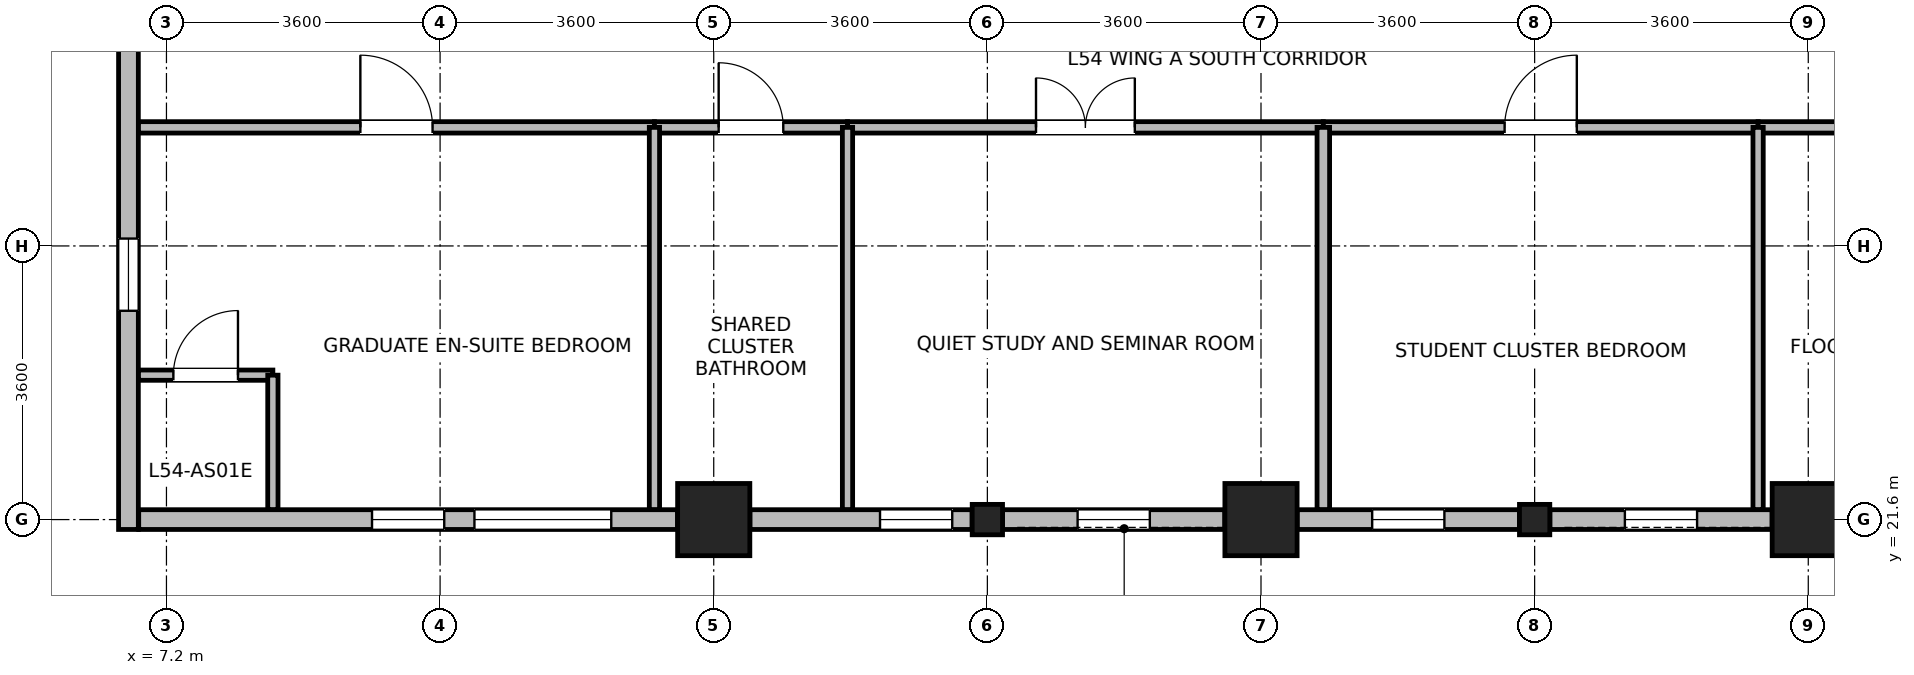
"""IFC4 building model, lengths in metres.
Left out: names, types, materials, properties, quantities, classifications, styles, units other than length and angle.
Written with IfcOpenShell. Run it as: python <this file> out.ifc"""

import sys

from ifc_helpers import new_model, si_unit, direction, frame, frame_2d, origin, origin_2d, place, context, subcontext, project, spatial, rectangle, i_section, extrude, source, transform, mapped, element, fill, save


model = new_model("IFC4")
c1 = context("Model", 3, precision=1e-05, world=origin(), true_north=direction((0.0, 1.0)))
c2 = subcontext(c1, "Body", "Model", "MODEL_VIEW")
j1 = project(units=[si_unit("LENGTHUNIT", "METRE"), si_unit("PLANEANGLEUNIT", "RADIAN")], contexts=[c1])
p1 = place(None, origin())
s1 = spatial("IfcSite", under=j1, at=p1, CompositionType="ELEMENT")
p2 = place(p1, origin())
s2 = spatial("IfcBuilding", under=s1, at=p2, CompositionType="ELEMENT")
p3 = place(p2, frame((0.0, 0.0, 212.9)))
s3 = spatial("IfcBuildingStorey", under=s2, at=p3, CompositionType="ELEMENT", Elevation=212.9)
m1 = source(origin(), c2, "Body", "SweptSolid", [
    extrude(rectangle(XDim=0.95, YDim=0.95, at=origin_2d()), origin(), (0.0, 0.0, 1.0), 3.7),
])
for number, where, z_axis, x_axis in (
    (1, (14.4, 21.6, 0.0), (0.0, 0.0, 1.0), (1.0, 0.0, 0.0)),
    (2, (21.6, 21.6, 0.0), (0.0, 0.0, 1.0), (1.0, 0.0, 0.0)),
    (3, (28.8, 21.6, 0.0), (0.0, 0.0, 1.0), (1.0, 0.0, 0.0)),
):
    element("IfcColumn", number, at=place(p3, frame(where, z_axis=z_axis, x_axis=x_axis)), inside=s3, PredefinedType="COLUMN", context=c2, shape_type="MappedRepresentation", body=[
        mapped(m1, transform((0.0, 0.0, 0.0), x_axis=(1.0, 0.0, 0.0), y_axis=(0.0, 1.0, 0.0), z_axis=(0.0, 0.0, 1.0), scale=1.0)),
    ])
m2 = source(origin(), c2, "Body", "SweptSolid", [
    extrude(i_section(OverallWidth=0.399, OverallDepth=0.4, WebThickness=0.017, FlangeThickness=0.023, FilletRadius=0.015, at=origin_2d()), origin(), (0.0, 0.0, 1.0), 3.7),
])
for number, where, z_axis, x_axis in (
    (4, (18.0, 21.6, 0.0), (0.0, 0.0, 1.0), (1.0, 0.0, 0.0)),
    (5, (25.2, 21.6, 0.0), (0.0, 0.0, 1.0), (1.0, 0.0, 0.0)),
):
    element("IfcColumn", number, at=place(p3, frame(where, z_axis=z_axis, x_axis=x_axis)), inside=s3, PredefinedType="COLUMN", context=c2, shape_type="MappedRepresentation", body=[
        mapped(m2, transform((0.0, 0.0, 0.0), x_axis=(1.0, 0.0, 0.0), y_axis=(0.0, 1.0, 0.0), z_axis=(0.0, 0.0, 1.0), scale=1.0)),
    ])
p4 = place(p3, frame((6.7, 21.47, 0.0), z_axis=(0.0, 0.0, 1.0), x_axis=(0.0, 1.0, 0.0)))
e6 = element("IfcWall", 6, at=p4, inside=s3, PredefinedType="STANDARD", context=c2, shape_type="SweptSolid", body=[
    extrude(rectangle(XDim=6.704, YDim=0.26, at=frame_2d((3.352, 0.0))), origin(), (0.0, 0.0, 1.0), 3.45),
])
p5 = place(p4, frame((2.877, 0.0, 0.85)))
e7 = element("IfcOpeningElement", 7, at=p5, cuts=e6, PredefinedType="OPENING", context=c2, shape_type="SweptSolid", body=[
    extrude(rectangle(XDim=0.95, YDim=1.75, at=frame_2d((0.475, 0.875))), frame((0.0, 0.14, 0.0), z_axis=(0.0, -1.0, 0.0), x_axis=(1.0, 0.0, 0.0)), (0.0, 0.0, 1.0), 0.28),
])
p6 = place(p3, frame((13.924, 21.6, 0.0), z_axis=(0.0, 0.0, 1.0), x_axis=(-1.0, 0.0, 0.0)))
e8 = element("IfcWall", 8, at=p6, inside=s3, PredefinedType="STANDARD", context=c2, shape_type="SweptSolid", body=[
    extrude(rectangle(XDim=7.089, YDim=0.26, at=frame_2d((3.544, 0.0))), origin(), (0.0, 0.0, 1.0), 3.45),
])
p7 = place(p6, frame((0.872, 0.0, 0.85)))
e9 = element("IfcOpeningElement", 9, at=p7, cuts=e8, PredefinedType="OPENING", context=c2, shape_type="SweptSolid", body=[
    extrude(rectangle(XDim=1.8, YDim=1.85, at=frame_2d((0.9, 0.925))), frame((0.0, 0.14, 0.0), z_axis=(0.0, -1.0, 0.0), x_axis=(1.0, 0.0, 0.0)), (0.0, 0.0, 1.0), 0.28),
])
p8 = place(p6, frame((3.07, 0.0, 0.85)))
e10 = element("IfcOpeningElement", 10, at=p8, cuts=e8, PredefinedType="OPENING", context=c2, shape_type="SweptSolid", body=[
    extrude(rectangle(XDim=0.95, YDim=1.75, at=frame_2d((0.475, 0.875))), frame((0.0, 0.14, 0.0), z_axis=(0.0, -1.0, 0.0), x_axis=(1.0, 0.0, 0.0)), (0.0, 0.0, 1.0), 0.28),
])
p9 = place(p3, frame((17.8, 21.6, 0.0), z_axis=(0.0, 0.0, 1.0), x_axis=(-1.0, 0.0, 0.0)))
e11 = element("IfcWall", 11, at=p9, inside=s3, PredefinedType="STANDARD", context=c2, shape_type="SweptSolid", body=[
    extrude(rectangle(XDim=2.924, YDim=0.26, at=frame_2d((1.462, 0.0))), origin(), (0.0, 0.0, 1.0), 3.05),
])
p10 = place(p9, frame((0.262, 0.0, 0.85)))
e12 = element("IfcOpeningElement", 12, at=p10, cuts=e11, PredefinedType="OPENING", context=c2, shape_type="SweptSolid", body=[
    extrude(rectangle(XDim=0.95, YDim=1.75, at=frame_2d((0.475, 0.875))), frame((0.0, 0.14, 0.0), z_axis=(0.0, -1.0, 0.0), x_axis=(1.0, 0.0, 0.0)), (0.0, 0.0, 1.0), 0.28),
])
p11 = place(p3, frame((21.124, 21.6, 0.0), z_axis=(0.0, 0.0, 1.0), x_axis=(-1.0, 0.0, 0.0)))
e13 = element("IfcWall", 13, at=p11, inside=s3, PredefinedType="STANDARD", context=c2, shape_type="SweptSolid", body=[
    extrude(rectangle(XDim=2.924, YDim=0.26, at=frame_2d((1.462, 0.0))), origin(), (0.0, 0.0, 1.0), 3.05),
])
p12 = place(p11, frame((0.987, 0.0, 0.85)))
e14 = element("IfcOpeningElement", 14, at=p12, cuts=e13, PredefinedType="OPENING", context=c2, shape_type="SweptSolid", body=[
    extrude(rectangle(XDim=0.95, YDim=1.75, at=frame_2d((0.475, 0.875))), frame((0.0, 0.14, 0.0), z_axis=(0.0, -1.0, 0.0), x_axis=(1.0, 0.0, 0.0)), (0.0, 0.0, 1.0), 0.28),
])
p13 = place(p3, frame((25.0, 21.6, 0.0), z_axis=(0.0, 0.0, 1.0), x_axis=(-1.0, 0.0, 0.0)))
e15 = element("IfcWall", 15, at=p13, inside=s3, PredefinedType="STANDARD", context=c2, shape_type="SweptSolid", body=[
    extrude(rectangle(XDim=2.924, YDim=0.26, at=frame_2d((1.462, 0.0))), origin(), (0.0, 0.0, 1.0), 3.05),
])
p14 = place(p13, frame((0.987, 0.0, 0.85)))
e16 = element("IfcOpeningElement", 16, at=p14, cuts=e15, PredefinedType="OPENING", context=c2, shape_type="SweptSolid", body=[
    extrude(rectangle(XDim=0.95, YDim=1.75, at=frame_2d((0.475, 0.875))), frame((0.0, 0.14, 0.0), z_axis=(0.0, -1.0, 0.0), x_axis=(1.0, 0.0, 0.0)), (0.0, 0.0, 1.0), 0.28),
])
p15 = place(p3, frame((28.324, 21.6, 0.0), z_axis=(0.0, 0.0, 1.0), x_axis=(-1.0, 0.0, 0.0)))
e17 = element("IfcWall", 17, at=p15, inside=s3, PredefinedType="STANDARD", context=c2, shape_type="SweptSolid", body=[
    extrude(rectangle(XDim=2.924, YDim=0.26, at=frame_2d((1.462, 0.0))), origin(), (0.0, 0.0, 1.0), 3.05),
])
p16 = place(p15, frame((0.987, 0.0, 0.85)))
e18 = element("IfcOpeningElement", 18, at=p16, cuts=e17, PredefinedType="OPENING", context=c2, shape_type="SweptSolid", body=[
    extrude(rectangle(XDim=0.95, YDim=1.75, at=frame_2d((0.475, 0.875))), frame((0.0, 0.14, 0.0), z_axis=(0.0, -1.0, 0.0), x_axis=(1.0, 0.0, 0.0)), (0.0, 0.0, 1.0), 0.28),
])
p17 = place(p3, frame((6.832, 23.5, 0.0), z_axis=(0.0, 0.0, 1.0), x_axis=(1.0, 0.0, 0.0)))
e19 = element("IfcWall", 19, at=p17, inside=s3, PredefinedType="PARTITIONING", context=c2, shape_type="SweptSolid", body=[
    extrude(rectangle(XDim=1.768, YDim=0.135, at=frame_2d((0.884, 0.0))), origin(), (0.0, 0.0, 1.0), 3.45),
])
p18 = place(p17, frame((0.459, 0.0, 0.0)))
e20 = element("IfcOpeningElement", 20, at=p18, cuts=e19, PredefinedType="OPENING", context=c2, shape_type="SweptSolid", body=[
    extrude(rectangle(XDim=0.85, YDim=2.04, at=frame_2d((0.425, 1.02))), frame((0.0, 0.078, 0.0), z_axis=(0.0, -1.0, 0.0), x_axis=(1.0, 0.0, 0.0)), (0.0, 0.0, 1.0), 0.155),
])
p19 = place(p3, frame((8.6, 21.732, 0.0), z_axis=(0.0, 0.0, 1.0), x_axis=(0.0, 1.0, 0.0)))
e21 = element("IfcWall", 21, at=p19, inside=s3, PredefinedType="PARTITIONING", context=c2, shape_type="SweptSolid", body=[
    extrude(rectangle(XDim=1.768, YDim=0.135, at=frame_2d((0.884, 0.0))), origin(), (0.0, 0.0, 1.0), 3.45),
])
p20 = place(p3, frame((6.832, 26.76, 0.0), z_axis=(0.0, 0.0, 1.0), x_axis=(1.0, 0.0, 0.0)))
e22 = element("IfcWall", 22, at=p20, inside=s3, PredefinedType="PARTITIONING", context=c2, shape_type="SweptSolid", body=[
    extrude(rectangle(XDim=6.788, YDim=0.15, at=frame_2d((3.394, 0.0))), origin(), (0.0, 0.0, 1.0), 3.45),
])
p21 = place(p20, frame((2.919, 0.0, 0.0)))
e23 = element("IfcOpeningElement", 23, at=p21, cuts=e22, PredefinedType="OPENING", context=c2, shape_type="SweptSolid", body=[
    extrude(rectangle(XDim=0.95, YDim=2.1, at=frame_2d((0.475, 1.05))), frame((0.0, 0.085, 0.0), z_axis=(0.0, -1.0, 0.0), x_axis=(1.0, 0.0, 0.0)), (0.0, 0.0, 1.0), 0.17),
])
p22 = place(p3, frame((16.16, 26.76, 0.0), z_axis=(0.0, 0.0, 1.0), x_axis=(1.0, 0.0, 0.0)))
e24 = element("IfcWall", 24, at=p22, inside=s3, PredefinedType="PARTITIONING", context=c2, shape_type="SweptSolid", body=[
    extrude(rectangle(XDim=6.26, YDim=0.15, at=frame_2d((3.13, 0.0))), origin(), (0.0, 0.0, 1.0), 3.45),
])
p23 = place(p22, frame((2.48, 0.0, 0.0)))
e25 = element("IfcOpeningElement", 25, at=p23, cuts=e24, PredefinedType="OPENING", context=c2, shape_type="SweptSolid", body=[
    extrude(rectangle(XDim=1.3, YDim=2.12, at=frame_2d((0.65, 1.06))), frame((0.0, 0.085, 0.0), z_axis=(0.0, -1.0, 0.0), x_axis=(1.0, 0.0, 0.0)), (0.0, 0.0, 1.0), 0.17),
])
p24 = place(p3, frame((22.42, 26.76, 0.0), z_axis=(0.0, 0.0, 1.0), x_axis=(1.0, 0.0, 0.0)))
e26 = element("IfcWall", 26, at=p24, inside=s3, PredefinedType="PARTITIONING", context=c2, shape_type="SweptSolid", body=[
    extrude(rectangle(XDim=5.72, YDim=0.15, at=frame_2d((2.86, 0.0))), origin(), (0.0, 0.0, 1.0), 3.45),
])
p25 = place(p24, frame((2.385, 0.0, 0.0)))
e27 = element("IfcOpeningElement", 27, at=p25, cuts=e26, PredefinedType="OPENING", context=c2, shape_type="SweptSolid", body=[
    extrude(rectangle(XDim=0.95, YDim=2.1, at=frame_2d((0.475, 1.05))), frame((0.0, 0.085, 0.0), z_axis=(0.0, -1.0, 0.0), x_axis=(1.0, 0.0, 0.0)), (0.0, 0.0, 1.0), 0.17),
])
p26 = place(p3, frame((28.14, 26.76, 0.0), z_axis=(0.0, 0.0, 1.0), x_axis=(1.0, 0.0, 0.0)))
e28 = element("IfcWall", 28, at=p26, inside=s3, PredefinedType="PARTITIONING", context=c2, shape_type="SweptSolid", body=[
    extrude(rectangle(XDim=5.22, YDim=0.15, at=frame_2d((2.61, 0.0))), origin(), (0.0, 0.0, 1.0), 3.45),
])
p27 = place(p26, frame((2.185, 0.0, 0.0)))
e29 = element("IfcOpeningElement", 29, at=p27, cuts=e28, PredefinedType="OPENING", context=c2, shape_type="SweptSolid", body=[
    extrude(rectangle(XDim=0.85, YDim=2.04, at=frame_2d((0.425, 1.02))), frame((0.0, 0.085, 0.0), z_axis=(0.0, -1.0, 0.0), x_axis=(1.0, 0.0, 0.0)), (0.0, 0.0, 1.0), 0.17),
])
p28 = place(p3, frame((13.62, 26.76, 0.0), z_axis=(0.0, 0.0, 1.0), x_axis=(1.0, 0.0, 0.0)))
e30 = element("IfcWall", 30, at=p28, inside=s3, PredefinedType="PARTITIONING", context=c2, shape_type="SweptSolid", body=[
    extrude(rectangle(XDim=2.54, YDim=0.15, at=frame_2d((1.27, 0.0))), origin(), (0.0, 0.0, 1.0), 3.45),
])
p29 = place(p28, frame((0.845, 0.0, 0.0)))
e31 = element("IfcOpeningElement", 31, at=p29, cuts=e30, PredefinedType="OPENING", context=c2, shape_type="SweptSolid", body=[
    extrude(rectangle(XDim=0.85, YDim=2.04, at=frame_2d((0.425, 1.02))), frame((0.0, 0.085, 0.0), z_axis=(0.0, -1.0, 0.0), x_axis=(1.0, 0.0, 0.0)), (0.0, 0.0, 1.0), 0.17),
])
for number, where, z_axis, x_axis in (
    (32, (13.62, 21.732, 0.0), (0.0, 0.0, 1.0), (0.0, 1.0, 0.0)),
    (33, (16.16, 21.732, 0.0), (0.0, 0.0, 1.0), (0.0, 1.0, 0.0)),
):
    element("IfcWall", number, at=place(p3, frame(where, z_axis=z_axis, x_axis=x_axis)), inside=s3, PredefinedType="PARTITIONING", context=c2, shape_type="SweptSolid", body=[
        extrude(rectangle(XDim=5.028, YDim=0.135, at=frame_2d((2.514, 0.0))), origin(), (0.0, 0.0, 1.0), 3.45),
    ])
p30 = place(p3, frame((22.42, 21.732, 0.0), z_axis=(0.0, 0.0, 1.0), x_axis=(0.0, 1.0, 0.0)))
e34 = element("IfcWall", 34, at=p30, inside=s3, PredefinedType="PARTITIONING", context=c2, shape_type="SweptSolid", body=[
    extrude(rectangle(XDim=5.028, YDim=0.165, at=frame_2d((2.514, 0.0))), origin(), (0.0, 0.0, 1.0), 3.45),
])
p31 = place(p3, frame((28.14, 21.732, 0.0), z_axis=(0.0, 0.0, 1.0), x_axis=(0.0, 1.0, 0.0)))
e35 = element("IfcWall", 35, at=p31, inside=s3, PredefinedType="PARTITIONING", context=c2, shape_type="SweptSolid", body=[
    extrude(rectangle(XDim=5.028, YDim=0.135, at=frame_2d((2.514, 0.0))), origin(), (0.0, 0.0, 1.0), 3.45),
])
p32 = place(p5, origin())
e36 = element("IfcWindow", 36, at=p32, inside=s3, PartitioningType="SINGLE_PANEL", PredefinedType="WINDOW", context=c2, shape_type="SweptSolid", body=[
    extrude(rectangle(XDim=0.95, YDim=1.75, at=frame_2d((0.475, 0.875))), frame((0.0, 0.03, 0.0), z_axis=(0.0, -1.0, 0.0), x_axis=(1.0, 0.0, 0.0)), (0.0, 0.0, 1.0), 0.06),
])
fill(e7, e36)
p33 = place(p7, origin())
e37 = element("IfcWindow", 37, at=p33, inside=s3, PartitioningType="SINGLE_PANEL", PredefinedType="WINDOW", context=c2, shape_type="SweptSolid", body=[
    extrude(rectangle(XDim=1.8, YDim=1.85, at=frame_2d((0.9, 0.925))), frame((0.0, 0.03, 0.0), z_axis=(0.0, -1.0, 0.0), x_axis=(1.0, 0.0, 0.0)), (0.0, 0.0, 1.0), 0.06),
])
fill(e9, e37)
p34 = place(p8, origin())
e38 = element("IfcWindow", 38, at=p34, inside=s3, PartitioningType="SINGLE_PANEL", PredefinedType="WINDOW", context=c2, shape_type="SweptSolid", body=[
    extrude(rectangle(XDim=0.95, YDim=1.75, at=frame_2d((0.475, 0.875))), frame((0.0, 0.03, 0.0), z_axis=(0.0, -1.0, 0.0), x_axis=(1.0, 0.0, 0.0)), (0.0, 0.0, 1.0), 0.06),
])
fill(e10, e38)
p35 = place(p10, origin())
e39 = element("IfcWindow", 39, at=p35, inside=s3, PartitioningType="SINGLE_PANEL", PredefinedType="WINDOW", context=c2, shape_type="SweptSolid", body=[
    extrude(rectangle(XDim=0.95, YDim=1.75, at=frame_2d((0.475, 0.875))), frame((0.0, 0.03, 0.0), z_axis=(0.0, -1.0, 0.0), x_axis=(1.0, 0.0, 0.0)), (0.0, 0.0, 1.0), 0.06),
])
fill(e12, e39)
p36 = place(p12, origin())
e40 = element("IfcWindow", 40, at=p36, inside=s3, PartitioningType="SINGLE_PANEL", PredefinedType="WINDOW", context=c2, shape_type="SweptSolid", body=[
    extrude(rectangle(XDim=0.95, YDim=1.75, at=frame_2d((0.475, 0.875))), frame((0.0, 0.03, 0.0), z_axis=(0.0, -1.0, 0.0), x_axis=(1.0, 0.0, 0.0)), (0.0, 0.0, 1.0), 0.06),
])
fill(e14, e40)
p37 = place(p14, origin())
e41 = element("IfcWindow", 41, at=p37, inside=s3, PartitioningType="SINGLE_PANEL", PredefinedType="WINDOW", context=c2, shape_type="SweptSolid", body=[
    extrude(rectangle(XDim=0.95, YDim=1.75, at=frame_2d((0.475, 0.875))), frame((0.0, 0.03, 0.0), z_axis=(0.0, -1.0, 0.0), x_axis=(1.0, 0.0, 0.0)), (0.0, 0.0, 1.0), 0.06),
])
fill(e16, e41)
p38 = place(p16, origin())
e42 = element("IfcWindow", 42, at=p38, inside=s3, PartitioningType="SINGLE_PANEL", PredefinedType="WINDOW", context=c2, shape_type="SweptSolid", body=[
    extrude(rectangle(XDim=0.95, YDim=1.75, at=frame_2d((0.475, 0.875))), frame((0.0, 0.03, 0.0), z_axis=(0.0, -1.0, 0.0), x_axis=(1.0, 0.0, 0.0)), (0.0, 0.0, 1.0), 0.06),
])
fill(e18, e42)
p39 = place(p18, origin())
e43 = element("IfcDoor", 43, at=p39, inside=s3, OperationType="SINGLE_SWING_RIGHT", PredefinedType="DOOR", context=c2, shape_type="SweptSolid", body=[
    extrude(rectangle(XDim=0.85, YDim=2.04, at=frame_2d((0.425, 1.02))), frame((0.0, 0.025, 0.0), z_axis=(0.0, -1.0, 0.0), x_axis=(1.0, 0.0, 0.0)), (0.0, 0.0, 1.0), 0.05),
])
fill(e20, e43)
p40 = place(p21, origin())
e44 = element("IfcDoor", 44, at=p40, inside=s3, OperationType="SINGLE_SWING_LEFT", PredefinedType="DOOR", context=c2, shape_type="SweptSolid", body=[
    extrude(rectangle(XDim=0.95, YDim=2.1, at=frame_2d((0.475, 1.05))), frame((0.0, 0.025, 0.0), z_axis=(0.0, -1.0, 0.0), x_axis=(1.0, 0.0, 0.0)), (0.0, 0.0, 1.0), 0.05),
])
fill(e23, e44)
p41 = place(p23, origin())
e45 = element("IfcDoor", 45, at=p41, inside=s3, OperationType="DOUBLE_DOOR_SINGLE_SWING", PredefinedType="DOOR", context=c2, shape_type="SweptSolid", body=[
    extrude(rectangle(XDim=1.3, YDim=2.12, at=frame_2d((0.65, 1.06))), frame((0.0, 0.025, 0.0), z_axis=(0.0, -1.0, 0.0), x_axis=(1.0, 0.0, 0.0)), (0.0, 0.0, 1.0), 0.05),
])
fill(e25, e45)
p42 = place(p25, origin())
e46 = element("IfcDoor", 46, at=p42, inside=s3, OperationType="SINGLE_SWING_RIGHT", PredefinedType="DOOR", context=c2, shape_type="SweptSolid", body=[
    extrude(rectangle(XDim=0.95, YDim=2.1, at=frame_2d((0.475, 1.05))), frame((0.0, 0.025, 0.0), z_axis=(0.0, -1.0, 0.0), x_axis=(1.0, 0.0, 0.0)), (0.0, 0.0, 1.0), 0.05),
])
fill(e27, e46)
p43 = place(p29, origin())
e47 = element("IfcDoor", 47, at=p43, inside=s3, OperationType="SINGLE_SWING_LEFT", PredefinedType="DOOR", context=c2, shape_type="SweptSolid", body=[
    extrude(rectangle(XDim=0.85, YDim=2.04, at=frame_2d((0.425, 1.02))), frame((0.0, 0.025, 0.0), z_axis=(0.0, -1.0, 0.0), x_axis=(1.0, 0.0, 0.0)), (0.0, 0.0, 1.0), 0.05),
])
fill(e31, e47)
save(model, sys.argv[1])
